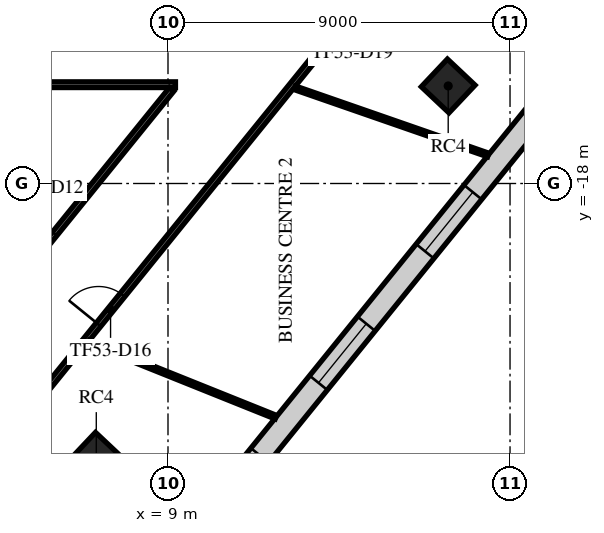
"""IFC4 building model, lengths in metres.
Left out: names, types, materials, properties, quantities, classifications, styles, units other than length and angle.
Written with IfcOpenShell. Run it as: python <this file> out.ifc"""

import sys

from ifc_helpers import new_model, si_unit, direction, frame, frame_2d, origin, origin_2d, place, context, subcontext, project, spatial, rectangle, extrude, element, fill, save


model = new_model("IFC4")
c1 = context("Model", 3, precision=1e-05, world=origin(), true_north=direction((0.0, 1.0)))
c2 = subcontext(c1, "Body", "Model", "MODEL_VIEW")
j1 = project(units=[si_unit("LENGTHUNIT", "METRE"), si_unit("PLANEANGLEUNIT", "RADIAN")], contexts=[c1])
p1 = place(None, origin())
s1 = spatial("IfcSite", under=j1, at=p1, CompositionType="ELEMENT")
p2 = place(p1, origin())
s2 = spatial("IfcBuilding", under=s1, at=p2, CompositionType="ELEMENT")
p3 = place(p2, frame((0.0, 0.0, 225.3)))
s3 = spatial("IfcBuildingStorey", under=s2, at=p3, CompositionType="ELEMENT", Elevation=225.3)
for number, where, z_axis, x_axis in (
    (1, (7.113, -25.257, 0.0), (0.0, 0.0, 1.0), (0.686, 0.728, 0.0)),
    (2, (16.373, -15.433, 0.0), (0.0, 0.0, 1.0), (0.686, 0.728, 0.0)),
):
    element("IfcColumn", number, at=place(p3, frame(where, z_axis=z_axis, x_axis=x_axis)), inside=s3, PredefinedType="COLUMN", context=c2, shape_type="SweptSolid", body=[
        extrude(rectangle(XDim=1.0, YDim=1.0, at=origin_2d()), origin(), (0.0, 0.0, 1.0), 4.0),
    ])
p4 = place(p3, frame((3.777, -34.584, 0.0), z_axis=(0.0, 0.0, 1.0), x_axis=(0.629323778295, 0.777143218508, 0.0)))
e3 = element("IfcWall", 3, at=p4, inside=s3, PredefinedType="STANDARD", context=c2, shape_type="SweptSolid", body=[
    extrude(rectangle(XDim=49.0, YDim=0.6, at=frame_2d((24.5, 0.0))), origin(), (0.0, 0.0, 1.0), 3.62),
])
p5 = place(p4, frame((1.227, 0.0, 0.9)))
e4 = element("IfcOpeningElement", 4, at=p5, cuts=e3, PredefinedType="OPENING", context=c2, shape_type="SweptSolid", body=[
    extrude(rectangle(XDim=2.0, YDim=2.1, at=frame_2d((1.0, 1.05))), frame((0.0, 0.31, 0.0), z_axis=(0.0, -1.0, 0.0), x_axis=(1.0, 0.0, 0.0)), (0.0, 0.0, 1.0), 0.62),
])
p6 = place(p4, frame((5.682, 0.0, 0.9)))
e5 = element("IfcOpeningElement", 5, at=p6, cuts=e3, PredefinedType="OPENING", context=c2, shape_type="SweptSolid", body=[
    extrude(rectangle(XDim=2.0, YDim=2.1, at=frame_2d((1.0, 1.05))), frame((0.0, 0.31, 0.0), z_axis=(0.0, -1.0, 0.0), x_axis=(1.0, 0.0, 0.0)), (0.0, 0.0, 1.0), 0.62),
])
p7 = place(p4, frame((10.136, 0.0, 0.9)))
e6 = element("IfcOpeningElement", 6, at=p7, cuts=e3, PredefinedType="OPENING", context=c2, shape_type="SweptSolid", body=[
    extrude(rectangle(XDim=2.0, YDim=2.1, at=frame_2d((1.0, 1.05))), frame((0.0, 0.31, 0.0), z_axis=(0.0, -1.0, 0.0), x_axis=(1.0, 0.0, 0.0)), (0.0, 0.0, 1.0), 0.62),
])
p8 = place(p4, frame((14.591, 0.0, 0.9)))
e7 = element("IfcOpeningElement", 7, at=p8, cuts=e3, PredefinedType="OPENING", context=c2, shape_type="SweptSolid", body=[
    extrude(rectangle(XDim=2.0, YDim=2.1, at=frame_2d((1.0, 1.05))), frame((0.0, 0.31, 0.0), z_axis=(0.0, -1.0, 0.0), x_axis=(1.0, 0.0, 0.0)), (0.0, 0.0, 1.0), 0.62),
])
p9 = place(p4, frame((19.045, 0.0, 0.9)))
e8 = element("IfcOpeningElement", 8, at=p9, cuts=e3, PredefinedType="OPENING", context=c2, shape_type="SweptSolid", body=[
    extrude(rectangle(XDim=2.0, YDim=2.1, at=frame_2d((1.0, 1.05))), frame((0.0, 0.31, 0.0), z_axis=(0.0, -1.0, 0.0), x_axis=(1.0, 0.0, 0.0)), (0.0, 0.0, 1.0), 0.62),
])
p10 = place(p4, frame((23.5, 0.0, 0.9)))
e9 = element("IfcOpeningElement", 9, at=p10, cuts=e3, PredefinedType="OPENING", context=c2, shape_type="SweptSolid", body=[
    extrude(rectangle(XDim=2.0, YDim=2.1, at=frame_2d((1.0, 1.05))), frame((0.0, 0.31, 0.0), z_axis=(0.0, -1.0, 0.0), x_axis=(1.0, 0.0, 0.0)), (0.0, 0.0, 1.0), 0.62),
])
p11 = place(p4, frame((27.955, 0.0, 0.9)))
e10 = element("IfcOpeningElement", 10, at=p11, cuts=e3, PredefinedType="OPENING", context=c2, shape_type="SweptSolid", body=[
    extrude(rectangle(XDim=2.0, YDim=2.1, at=frame_2d((1.0, 1.05))), frame((0.0, 0.31, 0.0), z_axis=(0.0, -1.0, 0.0), x_axis=(1.0, 0.0, 0.0)), (0.0, 0.0, 1.0), 0.62),
])
p12 = place(p4, frame((32.409, 0.0, 0.9)))
e11 = element("IfcOpeningElement", 11, at=p12, cuts=e3, PredefinedType="OPENING", context=c2, shape_type="SweptSolid", body=[
    extrude(rectangle(XDim=2.0, YDim=2.1, at=frame_2d((1.0, 1.05))), frame((0.0, 0.31, 0.0), z_axis=(0.0, -1.0, 0.0), x_axis=(1.0, 0.0, 0.0)), (0.0, 0.0, 1.0), 0.62),
])
p13 = place(p4, frame((36.864, 0.0, 0.9)))
e12 = element("IfcOpeningElement", 12, at=p13, cuts=e3, PredefinedType="OPENING", context=c2, shape_type="SweptSolid", body=[
    extrude(rectangle(XDim=2.0, YDim=2.1, at=frame_2d((1.0, 1.05))), frame((0.0, 0.31, 0.0), z_axis=(0.0, -1.0, 0.0), x_axis=(1.0, 0.0, 0.0)), (0.0, 0.0, 1.0), 0.62),
])
p14 = place(p4, frame((41.318, 0.0, 0.9)))
e13 = element("IfcOpeningElement", 13, at=p14, cuts=e3, PredefinedType="OPENING", context=c2, shape_type="SweptSolid", body=[
    extrude(rectangle(XDim=2.0, YDim=2.1, at=frame_2d((1.0, 1.05))), frame((0.0, 0.31, 0.0), z_axis=(0.0, -1.0, 0.0), x_axis=(1.0, 0.0, 0.0)), (0.0, 0.0, 1.0), 0.62),
])
p15 = place(p4, frame((45.773, 0.0, 0.9)))
e14 = element("IfcOpeningElement", 14, at=p15, cuts=e3, PredefinedType="OPENING", context=c2, shape_type="SweptSolid", body=[
    extrude(rectangle(XDim=2.0, YDim=2.1, at=frame_2d((1.0, 1.05))), frame((0.0, 0.31, 0.0), z_axis=(0.0, -1.0, 0.0), x_axis=(1.0, 0.0, 0.0)), (0.0, 0.0, 1.0), 0.62),
])
p16 = place(p3, frame((-12.293, -15.4, 0.0), z_axis=(0.0, 0.0, 1.0), x_axis=(1.0, 0.0, 0.0)))
e15 = element("IfcWall", 15, at=p16, inside=s3, PredefinedType="PARTITIONING", context=c2, shape_type="SweptSolid", body=[
    extrude(rectangle(XDim=21.489, YDim=0.15, at=frame_2d((10.745, 0.0))), origin(), (0.0, 0.0, 1.0), 3.17),
])
p17 = place(p16, frame((13.212, 0.0, 0.0)))
e16 = element("IfcOpeningElement", 16, at=p17, cuts=e15, PredefinedType="OPENING", context=c2, shape_type="SweptSolid", body=[
    extrude(rectangle(XDim=1.8, YDim=2.1, at=frame_2d((0.9, 1.05))), frame((0.0, 0.085, 0.0), z_axis=(0.0, -1.0, 0.0), x_axis=(1.0, 0.0, 0.0)), (0.0, 0.0, 1.0), 0.17),
])
p18 = place(p3, frame((1.268, -25.191, 0.0), z_axis=(0.0, 0.0, 1.0), x_axis=(0.629298143895, 0.777163976321, 0.0)))
e17 = element("IfcWall", 17, at=p18, inside=s3, PredefinedType="PARTITIONING", context=c2, shape_type="SweptSolid", body=[
    extrude(rectangle(XDim=12.441, YDim=0.15, at=frame_2d((6.22, 0.0))), origin(), (0.0, 0.0, 1.0), 3.17),
])
p19 = place(p18, frame((6.55, 0.0, 0.0)))
e18 = element("IfcOpeningElement", 18, at=p19, cuts=e17, PredefinedType="OPENING", context=c2, shape_type="SweptSolid", body=[
    extrude(rectangle(XDim=1.0, YDim=2.1, at=frame_2d((0.5, 1.05))), frame((0.0, 0.085, 0.0), z_axis=(0.0, -1.0, 0.0), x_axis=(1.0, 0.0, 0.0)), (0.0, 0.0, 1.0), 0.17),
])
p20 = place(p3, frame((3.18, -26.643, 0.0), z_axis=(0.0, 0.0, 1.0), x_axis=(0.629322822444, 0.777143992547, 0.0)))
e19 = element("IfcWall", 19, at=p20, inside=s3, PredefinedType="PARTITIONING", context=c2, shape_type="SweptSolid", body=[
    extrude(rectangle(XDim=37.483, YDim=0.15, at=frame_2d((18.741, 0.0))), origin(), (0.0, 0.0, 1.0), 3.17),
])
p21 = place(p20, frame((6.346, 0.0, 0.0)))
e20 = element("IfcOpeningElement", 20, at=p21, cuts=e19, PredefinedType="OPENING", context=c2, shape_type="SweptSolid", body=[
    extrude(rectangle(XDim=1.0, YDim=2.1, at=frame_2d((0.5, 1.05))), frame((0.0, 0.085, 0.0), z_axis=(0.0, -1.0, 0.0), x_axis=(1.0, 0.0, 0.0)), (0.0, 0.0, 1.0), 0.17),
])
p22 = place(p20, frame((16.452, 0.0, 0.0)))
e21 = element("IfcOpeningElement", 21, at=p22, cuts=e19, PredefinedType="OPENING", context=c2, shape_type="SweptSolid", body=[
    extrude(rectangle(XDim=1.0, YDim=2.1, at=frame_2d((0.5, 1.05))), frame((0.0, 0.085, 0.0), z_axis=(0.0, -1.0, 0.0), x_axis=(1.0, 0.0, 0.0)), (0.0, 0.0, 1.0), 0.17),
])
p23 = place(p20, frame((23.4, 0.0, 0.0)))
e22 = element("IfcOpeningElement", 22, at=p23, cuts=e19, PredefinedType="OPENING", context=c2, shape_type="SweptSolid", body=[
    extrude(rectangle(XDim=1.0, YDim=2.1, at=frame_2d((0.5, 1.05))), frame((0.0, 0.085, 0.0), z_axis=(0.0, -1.0, 0.0), x_axis=(1.0, 0.0, 0.0)), (0.0, 0.0, 1.0), 0.17),
])
p24 = place(p3, frame((6.915, -22.173, 0.0), z_axis=(0.0, 0.0, 1.0), x_axis=(0.928028539505, -0.372509100377, 0.0)))
e23 = element("IfcWall", 23, at=p24, inside=s3, PredefinedType="PARTITIONING", context=c2, shape_type="SweptSolid", body=[
    extrude(rectangle(XDim=5.305, YDim=0.1, at=frame_2d((2.653, 0.0))), origin(), (0.0, 0.0, 1.0), 2.97),
])
p25 = place(p3, frame((12.336, -15.482, 0.0), z_axis=(0.0, 0.0, 1.0), x_axis=(0.94462938415, -0.328139187845, 0.0)))
e24 = element("IfcWall", 24, at=p25, inside=s3, PredefinedType="PARTITIONING", context=c2, shape_type="SweptSolid", body=[
    extrude(rectangle(XDim=5.387, YDim=0.1, at=frame_2d((2.694, 0.0))), origin(), (0.0, 0.0, 1.0), 2.97),
])
p26 = place(p8, origin())
e25 = element("IfcWindow", 25, at=p26, inside=s3, PartitioningType="SINGLE_PANEL", PredefinedType="WINDOW", context=c2, shape_type="SweptSolid", body=[
    extrude(rectangle(XDim=2.0, YDim=2.1, at=frame_2d((1.0, 1.05))), frame((0.0, 0.03, 0.0), z_axis=(0.0, -1.0, 0.0), x_axis=(1.0, 0.0, 0.0)), (0.0, 0.0, 1.0), 0.06),
])
fill(e7, e25)
p27 = place(p9, origin())
e26 = element("IfcWindow", 26, at=p27, inside=s3, PartitioningType="SINGLE_PANEL", PredefinedType="WINDOW", context=c2, shape_type="SweptSolid", body=[
    extrude(rectangle(XDim=2.0, YDim=2.1, at=frame_2d((1.0, 1.05))), frame((0.0, 0.03, 0.0), z_axis=(0.0, -1.0, 0.0), x_axis=(1.0, 0.0, 0.0)), (0.0, 0.0, 1.0), 0.06),
])
fill(e8, e26)
p28 = place(p19, origin())
e27 = element("IfcDoor", 27, at=p28, inside=s3, OperationType="SINGLE_SWING_LEFT", PredefinedType="DOOR", context=c2, shape_type="SweptSolid", body=[
    extrude(rectangle(XDim=1.0, YDim=2.1, at=frame_2d((0.5, 1.05))), frame((0.0, 0.025, 0.0), z_axis=(0.0, -1.0, 0.0), x_axis=(1.0, 0.0, 0.0)), (0.0, 0.0, 1.0), 0.05),
])
fill(e18, e27)
p29 = place(p21, frame((1.0, 0.0, 0.0), z_axis=(0.0, 0.0, 1.0), x_axis=(-1.0, 0.0, 0.0)))
e28 = element("IfcDoor", 28, at=p29, inside=s3, OperationType="SINGLE_SWING_RIGHT", PredefinedType="DOOR", context=c2, shape_type="SweptSolid", body=[
    extrude(rectangle(XDim=1.0, YDim=2.1, at=frame_2d((0.5, 1.05))), frame((0.0, 0.025, 0.0), z_axis=(0.0, -1.0, 0.0), x_axis=(1.0, 0.0, 0.0)), (0.0, 0.0, 1.0), 0.05),
])
fill(e20, e28)
save(model, sys.argv[1])
